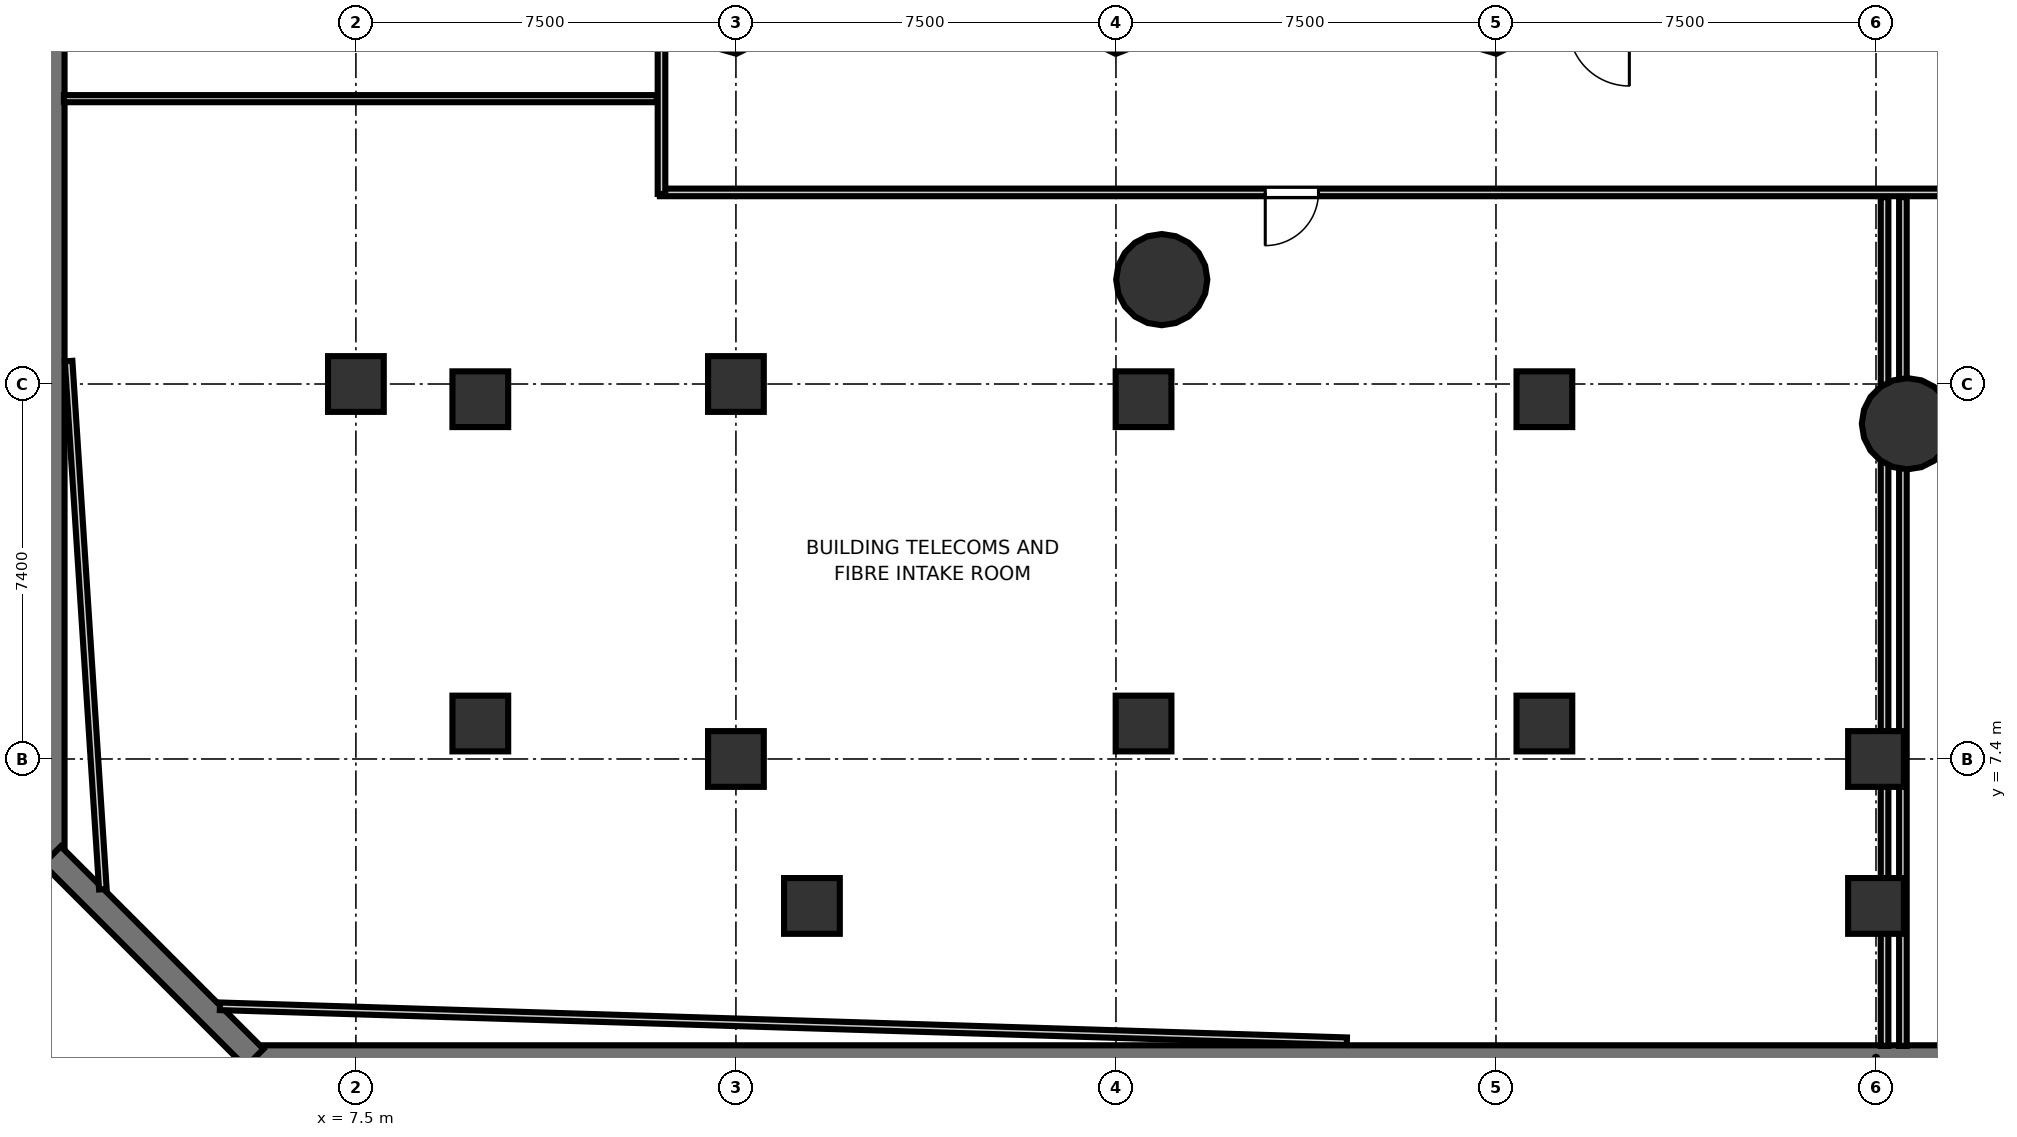
"""IFC4 building model, lengths in metres.
Left out: names, types, materials, properties, quantities, classifications, styles, units other than length and angle.
Written with IfcOpenShell. Run it as: python <this file> out.ifc"""

import sys

from ifc_helpers import new_model, si_unit, direction, frame, frame_2d, origin, origin_2d, place, context, subcontext, project, spatial, rectangle, hollow_circle, extrude, element, fill, save


model = new_model("IFC4")
c1 = context("Model", 3, precision=1e-05, world=origin(), true_north=direction((0.0, 1.0)))
c2 = subcontext(c1, "Body", "Model", "MODEL_VIEW")
j1 = project(units=[si_unit("LENGTHUNIT", "METRE"), si_unit("PLANEANGLEUNIT", "RADIAN")], contexts=[c1])
p1 = place(None, origin())
s1 = spatial("IfcSite", under=j1, at=p1, CompositionType="ELEMENT")
p2 = place(p1, origin())
s2 = spatial("IfcBuilding", under=s1, at=p2, CompositionType="ELEMENT")
p3 = place(p2, frame((0.0, 0.0, -5.6)))
s3 = spatial("IfcBuildingStorey", under=s2, at=p3, CompositionType="ELEMENT", Elevation=-5.6)
for number, where, z_axis, x_axis in (
    (1, (23.404, 16.86, 0.0), (0.0, 0.0, 1.0), (1.0, 0.0, 0.0)),
    (2, (38.12, 14.016, 0.0), (0.0, 0.0, 1.0), (1.0, 0.0, 0.0)),
):
    element("IfcColumn", number, at=place(p3, frame(where, z_axis=z_axis, x_axis=x_axis)), inside=s3, PredefinedType="COLUMN", context=c2, shape_type="SweptSolid", body=[
        extrude(hollow_circle(Radius=0.9, WallThickness=0.045, at=origin_2d()), origin(), (0.0, 0.0, 1.0), 5.6),
    ])
for number, where, z_axis, x_axis in (
    (3, (9.955, 8.1, 0.0), (0.0, 0.0, 1.0), (1.0, 0.0, 0.0)),
    (4, (9.955, 14.5, 0.0), (0.0, 0.0, 1.0), (1.0, 0.0, 0.0)),
    (5, (23.045, 8.1, 0.0), (0.0, 0.0, 1.0), (1.0, 0.0, 0.0)),
    (6, (23.045, 14.5, 0.0), (0.0, 0.0, 1.0), (1.0, 0.0, 0.0)),
    (7, (30.955, 8.1, 0.0), (0.0, 0.0, 1.0), (1.0, 0.0, 0.0)),
    (8, (30.955, 14.5, 0.0), (0.0, 0.0, 1.0), (1.0, 0.0, 0.0)),
    (9, (7.5, 14.8, 0.0), (0.0, 0.0, 1.0), (1.0, 0.0, 0.0)),
    (10, (15.0, 7.4, 0.0), (0.0, 0.0, 1.0), (1.0, 0.0, 0.0)),
    (11, (15.0, 14.8, 0.0), (0.0, 0.0, 1.0), (1.0, 0.0, 0.0)),
    (12, (37.5, 7.4, 0.0), (0.0, 0.0, 1.0), (1.0, 0.0, 0.0)),
    (13, (16.5, 4.5, 0.0), (0.0, 0.0, 1.0), (1.0, 0.0, 0.0)),
    (14, (37.5, 4.5, 0.0), (0.0, 0.0, 1.0), (1.0, 0.0, 0.0)),
):
    element("IfcColumn", number, at=place(p3, frame(where, z_axis=z_axis, x_axis=x_axis)), inside=s3, PredefinedType="COLUMN", context=c2, shape_type="SweptSolid", body=[
        extrude(rectangle(XDim=1.1, YDim=1.1, at=origin_2d()), origin(), (0.0, 0.0, 1.0), 5.6),
    ])
p4 = place(p3, frame((5.5, 1.5, 0.0), z_axis=(0.0, 0.0, 1.0), x_axis=(1.0, 0.0, 0.0)))
e15 = element("IfcWall", 15, at=p4, inside=s3, PredefinedType="SOLIDWALL", context=c2, shape_type="SweptSolid", body=[
    extrude(rectangle(XDim=64.0, YDim=0.5, at=frame_2d((32.0, 0.0))), origin(), (0.0, 0.0, 1.0), 5.3),
])
p5 = place(p3, frame((1.5, 46.5, 0.0), z_axis=(0.0, 0.0, 1.0), x_axis=(0.0, -1.0, 0.0)))
e16 = element("IfcWall", 16, at=p5, inside=s3, PredefinedType="SOLIDWALL", context=c2, shape_type="SweptSolid", body=[
    extrude(rectangle(XDim=41.0, YDim=0.5, at=frame_2d((20.5, 0.0))), origin(), (0.0, 0.0, 1.0), 5.3),
])
p6 = place(p3, frame((1.5, 5.5, 0.0), z_axis=(0.0, 0.0, 1.0), x_axis=(0.707106781187, -0.707106781187, 0.0)))
e17 = element("IfcWall", 17, at=p6, inside=s3, PredefinedType="SOLIDWALL", context=c2, shape_type="SweptSolid", body=[
    extrude(rectangle(XDim=5.657, YDim=0.5, at=frame_2d((2.828, 0.0))), origin(), (0.0, 0.0, 1.0), 5.3),
])
p7 = place(p3, frame((29.563, 21.53, 0.0), z_axis=(0.0, 0.0, 1.0), x_axis=(0.957010621041, -0.290052876583, 0.0)))
e18 = element("IfcWall", 18, at=p7, inside=s3, PredefinedType="PARTITIONING", context=c2, shape_type="SweptSolid", body=[
    extrude(rectangle(XDim=0.447, YDim=0.15, at=frame_2d((0.224, 0.0))), origin(), (0.0, 0.0, 1.0), 4.62),
])
p8 = place(p3, frame((30.014, 21.402, 0.0), z_axis=(0.0, 0.0, 1.0), x_axis=(0.893548213857, 0.448967247706, 0.0)))
e19 = element("IfcWall", 19, at=p8, inside=s3, PredefinedType="PARTITIONING", context=c2, shape_type="SweptSolid", body=[
    extrude(rectangle(XDim=0.779, YDim=0.15, at=frame_2d((0.39, 0.0))), origin(), (0.0, 0.0, 1.0), 4.62),
])
p9 = place(p3, frame((39.8, 18.581, 0.0), z_axis=(0.0, 0.0, 1.0), x_axis=(-1.0, 0.0, 0.0)))
e20 = element("IfcWall", 20, at=p9, inside=s3, PredefinedType="PARTITIONING", context=c2, shape_type="SweptSolid", body=[
    extrude(rectangle(XDim=26.3, YDim=0.15, at=frame_2d((13.15, 0.0))), origin(), (0.0, 0.0, 1.0), 4.62),
])
p10 = place(p9, frame((13.303, 0.0, 0.0)))
e21 = element("IfcOpeningElement", 21, at=p10, cuts=e20, PredefinedType="OPENING", context=c2, shape_type="SweptSolid", body=[
    extrude(rectangle(XDim=1.05, YDim=2.15, at=frame_2d((0.525, 1.075))), frame((0.0, 0.085, 0.0), z_axis=(0.0, -1.0, 0.0), x_axis=(1.0, 0.0, 0.0)), (0.0, 0.0, 1.0), 0.17),
])
p11 = place(p3, frame((13.531, 18.55, 0.0), z_axis=(0.0, 0.0, 1.0), x_axis=(0.0, 1.0, 0.0)))
e22 = element("IfcWall", 22, at=p11, inside=s3, PredefinedType="PARTITIONING", context=c2, shape_type="SweptSolid", body=[
    extrude(rectangle(XDim=3.304, YDim=0.15, at=frame_2d((1.652, 0.0))), origin(), (0.0, 0.0, 1.0), 4.62),
])
p12 = place(p3, frame((13.492, 21.824, 0.0), z_axis=(0.0, 0.0, 1.0), x_axis=(0.962241655343, -0.272196614093, 0.0)))
e23 = element("IfcWall", 23, at=p12, inside=s3, PredefinedType="PARTITIONING", context=c2, shape_type="SweptSolid", body=[
    extrude(rectangle(XDim=1.559, YDim=0.15, at=frame_2d((0.779, 0.0))), origin(), (0.0, 0.0, 1.0), 4.62),
])
p13 = place(p3, frame((15.014, 21.402, 0.0), z_axis=(0.0, 0.0, 1.0), x_axis=(0.895126158245, 0.44581292133, 0.0)))
e24 = element("IfcWall", 24, at=p13, inside=s3, PredefinedType="PARTITIONING", context=c2, shape_type="SweptSolid", body=[
    extrude(rectangle(XDim=0.767, YDim=0.15, at=frame_2d((0.384, 0.0))), origin(), (0.0, 0.0, 1.0), 4.62),
])
p14 = place(p3, frame((21.79, 21.752, 0.0), z_axis=(0.0, 0.0, 1.0), x_axis=(0.893485033775, -0.449092968572, 0.0)))
e25 = element("IfcWall", 25, at=p14, inside=s3, PredefinedType="PARTITIONING", context=c2, shape_type="SweptSolid", body=[
    extrude(rectangle(XDim=0.779, YDim=0.15, at=frame_2d((0.39, 0.0))), origin(), (0.0, 0.0, 1.0), 4.62),
])
p15 = place(p3, frame((22.511, 21.401, 0.0), z_axis=(0.0, 0.0, 1.0), x_axis=(0.93195721425, 0.362568270547, 0.0)))
e26 = element("IfcWall", 26, at=p15, inside=s3, PredefinedType="PARTITIONING", context=c2, shape_type="SweptSolid", body=[
    extrude(rectangle(XDim=0.966, YDim=0.15, at=frame_2d((0.483, 0.0))), origin(), (0.0, 0.0, 1.0), 4.62),
])
p16 = place(p3, frame((13.438, 20.431, 0.0), z_axis=(0.0, 0.0, 1.0), x_axis=(-1.0, 0.0, 0.0)))
e27 = element("IfcWall", 27, at=p16, inside=s3, PredefinedType="PARTITIONING", context=c2, shape_type="SweptSolid", body=[
    extrude(rectangle(XDim=11.7, YDim=0.14, at=frame_2d((5.85, 0.0))), origin(), (0.0, 0.0, 1.0), 4.62),
])
p17 = place(p3, frame((38.031, 1.738, 0.0), z_axis=(0.0, 0.0, 1.0), x_axis=(0.0, 1.0, 0.0)))
e28 = element("IfcWall", 28, at=p17, inside=s3, PredefinedType="PARTITIONING", context=c2, shape_type="SweptSolid", body=[
    extrude(rectangle(XDim=16.75, YDim=0.15, at=frame_2d((8.375, 0.0))), origin(), (0.0, 0.0, 1.0), 4.62),
])
p18 = place(p3, frame((27.057, 1.83, 0.0), z_axis=(0.0, 0.0, 1.0), x_axis=(-0.999519837888, 0.030985378306, 0.0)))
e29 = element("IfcWall", 29, at=p18, inside=s3, PredefinedType="PARTITIONING", context=c2, shape_type="SweptSolid", body=[
    extrude(rectangle(XDim=22.251, YDim=0.15, at=frame_2d((11.125, 0.0))), origin(), (0.0, 0.0, 1.0), 4.62),
])
p19 = place(p3, frame((2.506, 4.83, 0.0), z_axis=(0.0, 0.0, 1.0), x_axis=(-0.064751736741, 0.997901404242, 0.0)))
e30 = element("IfcWall", 30, at=p19, inside=s3, PredefinedType="PARTITIONING", context=c2, shape_type="SweptSolid", body=[
    extrude(rectangle(XDim=10.444, YDim=0.15, at=frame_2d((5.222, 0.0))), origin(), (0.0, 0.0, 1.0), 4.62),
])
p20 = place(p3, frame((37.669, 18.488, 0.0), z_axis=(0.0, 0.0, 1.0), x_axis=(0.0, -1.0, 0.0)))
e31 = element("IfcWall", 31, at=p20, inside=s3, PredefinedType="PARTITIONING", context=c2, shape_type="SweptSolid", body=[
    extrude(rectangle(XDim=16.75, YDim=0.15, at=frame_2d((8.375, 0.0))), origin(), (0.0, 0.0, 1.0), 4.62),
])
p21 = place(p10, origin())
e32 = element("IfcDoor", 32, at=p21, inside=s3, OperationType="SINGLE_SWING_RIGHT", PredefinedType="DOOR", context=c2, shape_type="SweptSolid", body=[
    extrude(rectangle(XDim=1.05, YDim=2.15, at=frame_2d((0.525, 1.075))), frame((0.0, 0.025, 0.0), z_axis=(0.0, -1.0, 0.0), x_axis=(1.0, 0.0, 0.0)), (0.0, 0.0, 1.0), 0.05),
])
fill(e21, e32)
save(model, sys.argv[1])
